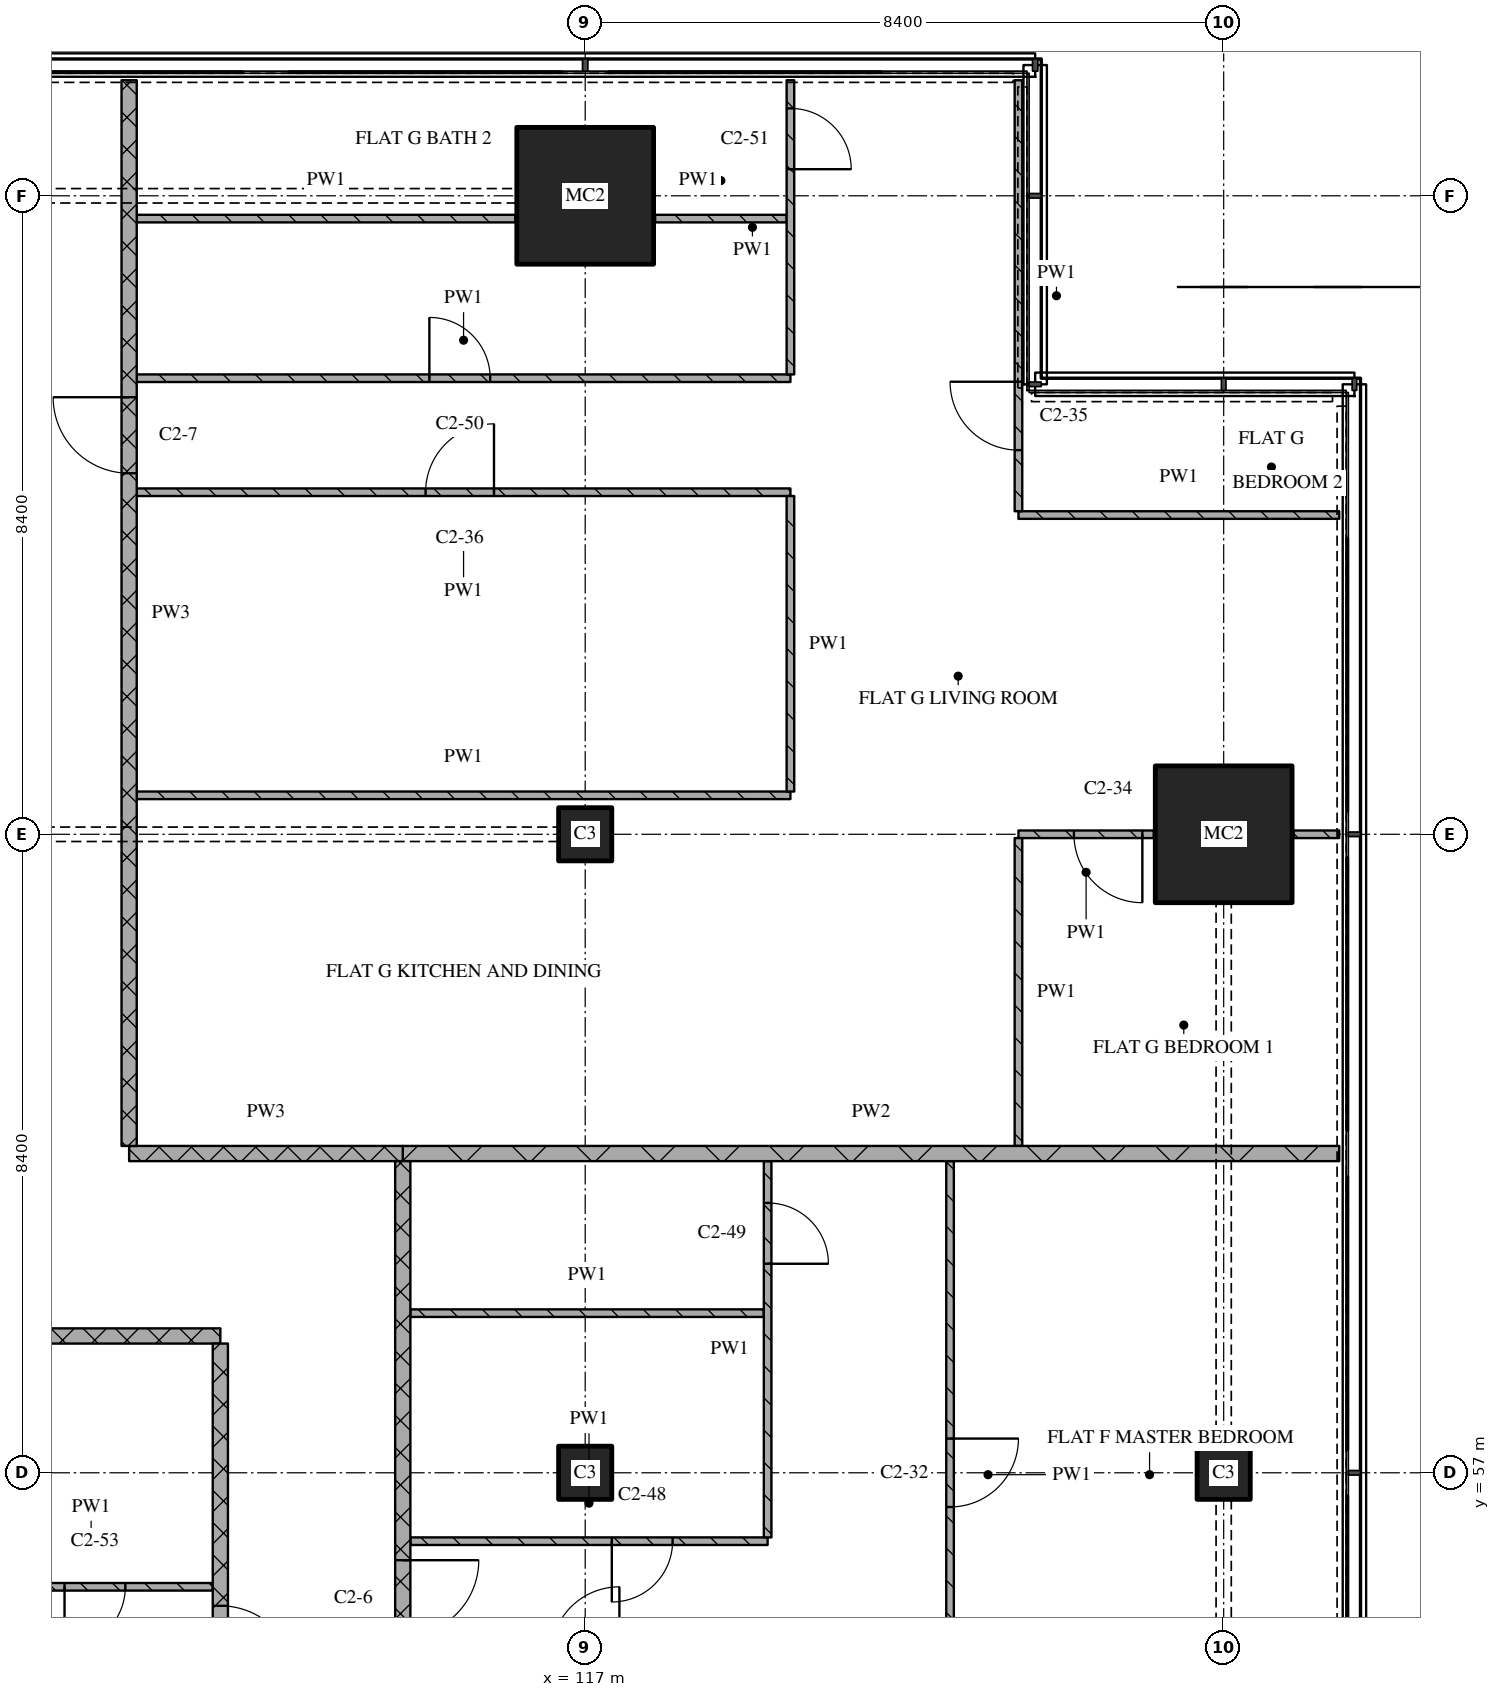
"""IFC4 building model, lengths in metres.
Left out: names, types, materials, properties, quantities, classifications, styles, units other than length and angle.
Written with IfcOpenShell. Run it as: python <this file> out.ifc"""

import sys

from ifc_helpers import new_model, si_unit, direction, frame, frame_2d, origin, origin_2d, place, context, subcontext, project, spatial, rectangle, extrude, element, fill, save


model = new_model("IFC4")
c1 = context("Model", 3, precision=1e-05, world=origin(), true_north=direction((0.0, 1.0)))
c2 = subcontext(c1, "Body", "Model", "MODEL_VIEW")
j1 = project(units=[si_unit("LENGTHUNIT", "METRE"), si_unit("PLANEANGLEUNIT", "RADIAN")], contexts=[c1])
p1 = place(None, origin())
s1 = spatial("IfcSite", under=j1, at=p1, CompositionType="ELEMENT")
p2 = place(p1, origin())
s2 = spatial("IfcBuilding", under=s1, at=p2, CompositionType="ELEMENT")
p3 = place(p2, frame((0.0, 0.0, 165.45)))
s3 = spatial("IfcBuildingStorey", under=s2, at=p3, CompositionType="ELEMENT", Elevation=165.45)
for number, where, z_axis, x_axis in (
    (1, (117.0, 57.0, 0.0), (0.0, 0.0, 1.0), (1.0, 0.0, 0.0)),
    (2, (117.0, 65.4, 0.0), (0.0, 0.0, 1.0), (1.0, 0.0, 0.0)),
):
    element("IfcColumn", number, at=place(p3, frame(where, z_axis=z_axis, x_axis=x_axis)), inside=s3, PredefinedType="COLUMN", context=c2, shape_type="SweptSolid", body=[
        extrude(rectangle(XDim=0.7, YDim=0.7, at=origin_2d()), origin(), (0.0, 0.0, 1.0), 3.6),
    ])
p4 = place(p3, frame((117.0, 73.8, 0.0), z_axis=(0.0, 0.0, 1.0), x_axis=(1.0, 0.0, 0.0)))
e3 = element("IfcColumn", 3, at=p4, inside=s3, PredefinedType="COLUMN", context=c2, shape_type="SweptSolid", body=[
    extrude(rectangle(XDim=1.8, YDim=1.8, at=origin_2d()), origin(), (0.0, 0.0, 1.0), 3.6),
])
p5 = place(p3, frame((125.4, 57.0, 0.0), z_axis=(0.0, 0.0, 1.0), x_axis=(1.0, 0.0, 0.0)))
e4 = element("IfcColumn", 4, at=p5, inside=s3, PredefinedType="COLUMN", context=c2, shape_type="SweptSolid", body=[
    extrude(rectangle(XDim=0.7, YDim=0.7, at=origin_2d()), origin(), (0.0, 0.0, 1.0), 3.6),
])
p6 = place(p3, frame((125.4, 65.4, 0.0), z_axis=(0.0, 0.0, 1.0), x_axis=(1.0, 0.0, 0.0)))
e5 = element("IfcColumn", 5, at=p6, inside=s3, PredefinedType="COLUMN", context=c2, shape_type="SweptSolid", body=[
    extrude(rectangle(XDim=1.8, YDim=1.8, at=origin_2d()), origin(), (0.0, 0.0, 1.0), 3.6),
])
p7 = place(p3, frame((108.9, 55.5, 0.0), z_axis=(0.0, 0.0, 1.0), x_axis=(1.0, 0.0, 0.0)))
e6 = element("IfcWall", 6, at=p7, inside=s3, PredefinedType="PARTITIONING", context=c2, shape_type="SweptSolid", body=[
    extrude(rectangle(XDim=3.2, YDim=0.1, at=frame_2d((1.6, 0.0))), origin(), (0.0, 0.0, 1.0), 3.32),
])
p8 = place(p7, frame((1.25, 0.0, 0.0)))
e7 = element("IfcOpeningElement", 7, at=p8, cuts=e6, PredefinedType="OPENING", context=c2, shape_type="SweptSolid", body=[
    extrude(rectangle(XDim=0.8, YDim=2.1, at=frame_2d((0.4, 1.05))), frame((0.0, 0.06, 0.0), z_axis=(0.0, -1.0, 0.0), x_axis=(1.0, 0.0, 0.0)), (0.0, 0.0, 1.0), 0.12),
])
p9 = place(p3, frame((114.7, 56.1, 0.0), z_axis=(0.0, 0.0, 1.0), x_axis=(1.0, 0.0, 0.0)))
e8 = element("IfcWall", 8, at=p9, inside=s3, PredefinedType="PARTITIONING", context=c2, shape_type="SweptSolid", body=[
    extrude(rectangle(XDim=4.7, YDim=0.1, at=frame_2d((2.35, 0.0))), origin(), (0.0, 0.0, 1.0), 3.32),
])
p10 = place(p9, frame((2.65, 0.0, 0.0)))
e9 = element("IfcOpeningElement", 9, at=p10, cuts=e8, PredefinedType="OPENING", context=c2, shape_type="SweptSolid", body=[
    extrude(rectangle(XDim=0.8, YDim=2.1, at=frame_2d((0.4, 1.05))), frame((0.0, 0.06, 0.0), z_axis=(0.0, -1.0, 0.0), x_axis=(1.0, 0.0, 0.0)), (0.0, 0.0, 1.0), 0.12),
])
p11 = place(p3, frame((101.4, 58.8, 0.0), z_axis=(0.0, 0.0, 1.0), x_axis=(1.0, 0.0, 0.0)))
e10 = element("IfcWall", 10, at=p11, inside=s3, PredefinedType="PARTITIONING", context=c2, shape_type="SweptSolid", body=[
    extrude(rectangle(XDim=10.8, YDim=0.2, at=frame_2d((5.4, 0.0))), origin(), (0.0, 0.0, 1.0), 3.32),
])
p12 = place(p3, frame((114.7, 59.1, 0.0), z_axis=(0.0, 0.0, 1.0), x_axis=(1.0, 0.0, 0.0)))
e11 = element("IfcWall", 11, at=p12, inside=s3, PredefinedType="PARTITIONING", context=c2, shape_type="SweptSolid", body=[
    extrude(rectangle(XDim=4.65, YDim=0.1, at=frame_2d((2.325, 0.0))), origin(), (0.0, 0.0, 1.0), 3.32),
])
p13 = place(p3, frame((111.0, 61.2, 0.0), z_axis=(0.0, 0.0, 1.0), x_axis=(1.0, 0.0, 0.0)))
e12 = element("IfcWall", 12, at=p13, inside=s3, PredefinedType="PARTITIONING", context=c2, shape_type="SweptSolid", body=[
    extrude(rectangle(XDim=3.6, YDim=0.2, at=frame_2d((1.8, 0.0))), origin(), (0.0, 0.0, 1.0), 3.32),
])
p14 = place(p3, frame((114.6, 61.2, 0.0), z_axis=(0.0, 0.0, 1.0), x_axis=(1.0, 0.0, 0.0)))
e13 = element("IfcWall", 13, at=p14, inside=s3, PredefinedType="PARTITIONING", context=c2, shape_type="SweptSolid", body=[
    extrude(rectangle(XDim=12.32, YDim=0.2, at=frame_2d((6.16, 0.0))), origin(), (0.0, 0.0, 1.0), 3.32),
])
p15 = place(p3, frame((124.48, 65.4, 0.0), z_axis=(0.0, 0.0, 1.0), x_axis=(-1.0, 0.0, 0.0)))
e14 = element("IfcWall", 14, at=p15, inside=s3, PredefinedType="PARTITIONING", context=c2, shape_type="SweptSolid", body=[
    extrude(rectangle(XDim=1.78, YDim=0.1, at=frame_2d((0.89, 0.0))), origin(), (0.0, 0.0, 1.0), 3.32),
])
p16 = place(p15, frame((0.15, 0.0, 0.0)))
e15 = element("IfcOpeningElement", 15, at=p16, cuts=e14, PredefinedType="OPENING", context=c2, shape_type="SweptSolid", body=[
    extrude(rectangle(XDim=0.9, YDim=2.1, at=frame_2d((0.45, 1.05))), frame((0.0, 0.06, 0.0), z_axis=(0.0, -1.0, 0.0), x_axis=(1.0, 0.0, 0.0)), (0.0, 0.0, 1.0), 0.12),
])
p17 = place(p3, frame((126.32, 65.4, 0.0), z_axis=(0.0, 0.0, 1.0), x_axis=(1.0, 0.0, 0.0)))
e16 = element("IfcWall", 16, at=p17, inside=s3, PredefinedType="PARTITIONING", context=c2, shape_type="SweptSolid", body=[
    extrude(rectangle(XDim=0.6, YDim=0.1, at=frame_2d((0.3, 0.0))), origin(), (0.0, 0.0, 1.0), 3.32),
])
p18 = place(p3, frame((111.1, 65.913, 0.0), z_axis=(0.0, 0.0, 1.0), x_axis=(1.0, 0.0, 0.0)))
e17 = element("IfcWall", 17, at=p18, inside=s3, PredefinedType="PARTITIONING", context=c2, shape_type="SweptSolid", body=[
    extrude(rectangle(XDim=8.6, YDim=0.1, at=frame_2d((4.3, 0.0))), origin(), (0.0, 0.0, 1.0), 3.32),
])
p19 = place(p3, frame((122.7, 69.6, 0.0), z_axis=(0.0, 0.0, 1.0), x_axis=(1.0, 0.0, 0.0)))
e18 = element("IfcWall", 18, at=p19, inside=s3, PredefinedType="PARTITIONING", context=c2, shape_type="SweptSolid", body=[
    extrude(rectangle(XDim=4.22, YDim=0.1, at=frame_2d((2.11, 0.0))), origin(), (0.0, 0.0, 1.0), 3.32),
])
p20 = place(p3, frame((119.7, 69.9, 0.0), z_axis=(0.0, 0.0, 1.0), x_axis=(-1.0, 0.0, 0.0)))
e19 = element("IfcWall", 19, at=p20, inside=s3, PredefinedType="PARTITIONING", context=c2, shape_type="SweptSolid", body=[
    extrude(rectangle(XDim=8.6, YDim=0.1, at=frame_2d((4.3, 0.0))), origin(), (0.0, 0.0, 1.0), 3.32),
])
p21 = place(p20, frame((3.9, 0.0, 0.0)))
e20 = element("IfcOpeningElement", 20, at=p21, cuts=e19, PredefinedType="OPENING", context=c2, shape_type="SweptSolid", body=[
    extrude(rectangle(XDim=0.9, YDim=2.1, at=frame_2d((0.45, 1.05))), frame((0.0, 0.06, 0.0), z_axis=(0.0, -1.0, 0.0), x_axis=(1.0, 0.0, 0.0)), (0.0, 0.0, 1.0), 0.12),
])
p22 = place(p3, frame((111.1, 71.4, 0.0), z_axis=(0.0, 0.0, 1.0), x_axis=(1.0, 0.0, 0.0)))
e21 = element("IfcWall", 21, at=p22, inside=s3, PredefinedType="PARTITIONING", context=c2, shape_type="SweptSolid", body=[
    extrude(rectangle(XDim=8.6, YDim=0.1, at=frame_2d((4.3, 0.0))), origin(), (0.0, 0.0, 1.0), 3.32),
])
p23 = place(p22, frame((3.85, 0.0, 0.0)))
e22 = element("IfcOpeningElement", 22, at=p23, cuts=e21, PredefinedType="OPENING", context=c2, shape_type="SweptSolid", body=[
    extrude(rectangle(XDim=0.8, YDim=2.1, at=frame_2d((0.4, 1.05))), frame((0.0, 0.06, 0.0), z_axis=(0.0, -1.0, 0.0), x_axis=(1.0, 0.0, 0.0)), (0.0, 0.0, 1.0), 0.12),
])
p24 = place(p3, frame((111.1, 73.5, 0.0), z_axis=(0.0, 0.0, 1.0), x_axis=(1.0, 0.0, 0.0)))
e23 = element("IfcWall", 23, at=p24, inside=s3, PredefinedType="PARTITIONING", context=c2, shape_type="SweptSolid", body=[
    extrude(rectangle(XDim=4.98, YDim=0.1, at=frame_2d((2.49, 0.0))), origin(), (0.0, 0.0, 1.0), 3.32),
])
p25 = place(p3, frame((117.92, 73.5, 0.0), z_axis=(0.0, 0.0, 1.0), x_axis=(1.0, 0.0, 0.0)))
e24 = element("IfcWall", 24, at=p25, inside=s3, PredefinedType="PARTITIONING", context=c2, shape_type="SweptSolid", body=[
    extrude(rectangle(XDim=1.73, YDim=0.1, at=frame_2d((0.865, 0.0))), origin(), (0.0, 0.0, 1.0), 3.32),
])
p26 = place(p3, frame((111.0, 75.32, 0.0), z_axis=(0.0, 0.0, 1.0), x_axis=(0.0, -1.0, 0.0)))
e25 = element("IfcWall", 25, at=p26, inside=s3, PredefinedType="PARTITIONING", context=c2, shape_type="SweptSolid", body=[
    extrude(rectangle(XDim=14.02, YDim=0.2, at=frame_2d((7.01, 0.0))), origin(), (0.0, 0.0, 1.0), 3.32),
])
p27 = place(p26, frame((4.17, 0.0, 0.0)))
e26 = element("IfcOpeningElement", 26, at=p27, cuts=e25, PredefinedType="OPENING", context=c2, shape_type="SweptSolid", body=[
    extrude(rectangle(XDim=1.0, YDim=2.1, at=frame_2d((0.5, 1.05))), frame((0.0, 0.11, 0.0), z_axis=(0.0, -1.0, 0.0), x_axis=(1.0, 0.0, 0.0)), (0.0, 0.0, 1.0), 0.22),
])
p28 = place(p3, frame((112.2, 43.3, 0.0), z_axis=(0.0, 0.0, 1.0), x_axis=(0.0, 1.0, 0.0)))
e27 = element("IfcWall", 27, at=p28, inside=s3, PredefinedType="PARTITIONING", context=c2, shape_type="SweptSolid", body=[
    extrude(rectangle(XDim=15.4, YDim=0.2, at=frame_2d((7.7, 0.0))), origin(), (0.0, 0.0, 1.0), 3.32),
])
p29 = place(p28, frame((10.95, 0.0, 0.0)))
e28 = element("IfcOpeningElement", 28, at=p29, cuts=e27, PredefinedType="OPENING", context=c2, shape_type="SweptSolid", body=[
    extrude(rectangle(XDim=1.0, YDim=2.1, at=frame_2d((0.5, 1.05))), frame((0.0, 0.11, 0.0), z_axis=(0.0, -1.0, 0.0), x_axis=(1.0, 0.0, 0.0)), (0.0, 0.0, 1.0), 0.22),
])
p30 = place(p3, frame((114.6, 61.1, 0.0), z_axis=(0.0, 0.0, 1.0), x_axis=(0.0, -1.0, 0.0)))
e29 = element("IfcWall", 29, at=p30, inside=s3, PredefinedType="PARTITIONING", context=c2, shape_type="SweptSolid", body=[
    extrude(rectangle(XDim=17.8, YDim=0.2, at=frame_2d((8.9, 0.0))), origin(), (0.0, 0.0, 1.0), 3.32),
])
p31 = place(p30, frame((5.25, 0.0, 0.0)))
e30 = element("IfcOpeningElement", 30, at=p31, cuts=e29, PredefinedType="OPENING", context=c2, shape_type="SweptSolid", body=[
    extrude(rectangle(XDim=1.0, YDim=2.1, at=frame_2d((0.5, 1.05))), frame((0.0, 0.11, 0.0), z_axis=(0.0, -1.0, 0.0), x_axis=(1.0, 0.0, 0.0)), (0.0, 0.0, 1.0), 0.22),
])
p32 = place(p3, frame((119.4, 56.15, 0.0), z_axis=(0.0, 0.0, 1.0), x_axis=(0.0, 1.0, 0.0)))
e31 = element("IfcWall", 31, at=p32, inside=s3, PredefinedType="PARTITIONING", context=c2, shape_type="SweptSolid", body=[
    extrude(rectangle(XDim=4.95, YDim=0.1, at=frame_2d((2.475, 0.0))), origin(), (0.0, 0.0, 1.0), 3.32),
])
p33 = place(p32, frame((3.6, 0.0, 0.0)))
e32 = element("IfcOpeningElement", 32, at=p33, cuts=e31, PredefinedType="OPENING", context=c2, shape_type="SweptSolid", body=[
    extrude(rectangle(XDim=0.8, YDim=2.1, at=frame_2d((0.4, 1.05))), frame((0.0, 0.06, 0.0), z_axis=(0.0, -1.0, 0.0), x_axis=(1.0, 0.0, 0.0)), (0.0, 0.0, 1.0), 0.12),
])
p34 = place(p3, frame((119.7, 69.85, 0.0), z_axis=(0.0, 0.0, 1.0), x_axis=(0.0, -1.0, 0.0)))
e33 = element("IfcWall", 33, at=p34, inside=s3, PredefinedType="PARTITIONING", context=c2, shape_type="SweptSolid", body=[
    extrude(rectangle(XDim=3.887, YDim=0.1, at=frame_2d((1.944, 0.0))), origin(), (0.0, 0.0, 1.0), 3.32),
])
p35 = place(p3, frame((119.7, 71.45, 0.0), z_axis=(0.0, 0.0, 1.0), x_axis=(0.0, 1.0, 0.0)))
e34 = element("IfcWall", 34, at=p35, inside=s3, PredefinedType="PARTITIONING", context=c2, shape_type="SweptSolid", body=[
    extrude(rectangle(XDim=3.87, YDim=0.1, at=frame_2d((1.935, 0.0))), origin(), (0.0, 0.0, 1.0), 3.32),
])
p36 = place(p35, frame((2.7, 0.0, 0.0)))
e35 = element("IfcOpeningElement", 35, at=p36, cuts=e34, PredefinedType="OPENING", context=c2, shape_type="SweptSolid", body=[
    extrude(rectangle(XDim=0.8, YDim=2.1, at=frame_2d((0.4, 1.05))), frame((0.0, 0.06, 0.0), z_axis=(0.0, -1.0, 0.0), x_axis=(1.0, 0.0, 0.0)), (0.0, 0.0, 1.0), 0.12),
])
p37 = place(p3, frame((121.8, 61.1, 0.0), z_axis=(0.0, 0.0, 1.0), x_axis=(0.0, -1.0, 0.0)))
e36 = element("IfcWall", 36, at=p37, inside=s3, PredefinedType="PARTITIONING", context=c2, shape_type="SweptSolid", body=[
    extrude(rectangle(XDim=8.25, YDim=0.1, at=frame_2d((4.125, 0.0))), origin(), (0.0, 0.0, 1.0), 3.32),
])
p38 = place(p37, frame((3.65, 0.0, 0.0)))
e37 = element("IfcOpeningElement", 37, at=p38, cuts=e36, PredefinedType="OPENING", context=c2, shape_type="SweptSolid", body=[
    extrude(rectangle(XDim=0.9, YDim=2.1, at=frame_2d((0.45, 1.05))), frame((0.0, 0.06, 0.0), z_axis=(0.0, -1.0, 0.0), x_axis=(1.0, 0.0, 0.0)), (0.0, 0.0, 1.0), 0.12),
])
p39 = place(p3, frame((122.7, 65.35, 0.0), z_axis=(0.0, 0.0, 1.0), x_axis=(0.0, -1.0, 0.0)))
e38 = element("IfcWall", 38, at=p39, inside=s3, PredefinedType="PARTITIONING", context=c2, shape_type="SweptSolid", body=[
    extrude(rectangle(XDim=4.05, YDim=0.1, at=frame_2d((2.025, 0.0))), origin(), (0.0, 0.0, 1.0), 3.32),
])
p40 = place(p3, frame((122.7, 75.32, 0.0), z_axis=(0.0, 0.0, 1.0), x_axis=(0.0, -1.0, 0.0)))
e39 = element("IfcWall", 39, at=p40, inside=s3, PredefinedType="PARTITIONING", context=c2, shape_type="SweptSolid", body=[
    extrude(rectangle(XDim=5.67, YDim=0.1, at=frame_2d((2.835, 0.0))), origin(), (0.0, 0.0, 1.0), 3.32),
])
p41 = place(p40, frame((3.966, 0.0, 0.0)))
e40 = element("IfcOpeningElement", 40, at=p41, cuts=e39, PredefinedType="OPENING", context=c2, shape_type="SweptSolid", body=[
    extrude(rectangle(XDim=0.9, YDim=2.1, at=frame_2d((0.45, 1.05))), frame((0.0, 0.06, 0.0), z_axis=(0.0, -1.0, 0.0), x_axis=(1.0, 0.0, 0.0)), (0.0, 0.0, 1.0), 0.12),
])
p42 = place(p8, origin())
e41 = element("IfcDoor", 41, at=p42, inside=s3, OperationType="SINGLE_SWING_RIGHT", PredefinedType="DOOR", context=c2, shape_type="SweptSolid", body=[
    extrude(rectangle(XDim=0.8, YDim=2.1, at=frame_2d((0.4, 1.05))), frame((0.0, 0.025, 0.0), z_axis=(0.0, -1.0, 0.0), x_axis=(1.0, 0.0, 0.0)), (0.0, 0.0, 1.0), 0.05),
])
fill(e7, e41)
p43 = place(p10, origin())
e42 = element("IfcDoor", 42, at=p43, inside=s3, OperationType="SINGLE_SWING_RIGHT", PredefinedType="DOOR", context=c2, shape_type="SweptSolid", body=[
    extrude(rectangle(XDim=0.8, YDim=2.1, at=frame_2d((0.4, 1.05))), frame((0.0, 0.025, 0.0), z_axis=(0.0, -1.0, 0.0), x_axis=(1.0, 0.0, 0.0)), (0.0, 0.0, 1.0), 0.05),
])
fill(e9, e42)
p44 = place(p16, origin())
e43 = element("IfcDoor", 43, at=p44, inside=s3, OperationType="SINGLE_SWING_LEFT", PredefinedType="DOOR", context=c2, shape_type="SweptSolid", body=[
    extrude(rectangle(XDim=0.9, YDim=2.1, at=frame_2d((0.45, 1.05))), frame((0.0, 0.025, 0.0), z_axis=(0.0, -1.0, 0.0), x_axis=(1.0, 0.0, 0.0)), (0.0, 0.0, 1.0), 0.05),
])
fill(e15, e43)
p45 = place(p21, origin())
e44 = element("IfcDoor", 44, at=p45, inside=s3, OperationType="SINGLE_SWING_RIGHT", PredefinedType="DOOR", context=c2, shape_type="SweptSolid", body=[
    extrude(rectangle(XDim=0.9, YDim=2.1, at=frame_2d((0.45, 1.05))), frame((0.0, 0.025, 0.0), z_axis=(0.0, -1.0, 0.0), x_axis=(1.0, 0.0, 0.0)), (0.0, 0.0, 1.0), 0.05),
])
fill(e20, e44)
p46 = place(p23, origin())
e45 = element("IfcDoor", 45, at=p46, inside=s3, OperationType="SINGLE_SWING_LEFT", PredefinedType="DOOR", context=c2, shape_type="SweptSolid", body=[
    extrude(rectangle(XDim=0.8, YDim=2.1, at=frame_2d((0.4, 1.05))), frame((0.0, 0.025, 0.0), z_axis=(0.0, -1.0, 0.0), x_axis=(1.0, 0.0, 0.0)), (0.0, 0.0, 1.0), 0.05),
])
fill(e22, e45)
p47 = place(p27, origin())
e46 = element("IfcDoor", 46, at=p47, inside=s3, OperationType="SINGLE_SWING_RIGHT", PredefinedType="DOOR", context=c2, shape_type="SweptSolid", body=[
    extrude(rectangle(XDim=1.0, YDim=2.1, at=frame_2d((0.5, 1.05))), frame((0.0, 0.025, 0.0), z_axis=(0.0, -1.0, 0.0), x_axis=(1.0, 0.0, 0.0)), (0.0, 0.0, 1.0), 0.05),
])
fill(e26, e46)
p48 = place(p29, origin())
e47 = element("IfcDoor", 47, at=p48, inside=s3, OperationType="SINGLE_SWING_RIGHT", PredefinedType="DOOR", context=c2, shape_type="SweptSolid", body=[
    extrude(rectangle(XDim=1.0, YDim=2.1, at=frame_2d((0.5, 1.05))), frame((0.0, 0.025, 0.0), z_axis=(0.0, -1.0, 0.0), x_axis=(1.0, 0.0, 0.0)), (0.0, 0.0, 1.0), 0.05),
])
fill(e28, e47)
p49 = place(p31, origin())
e48 = element("IfcDoor", 48, at=p49, inside=s3, OperationType="SINGLE_SWING_LEFT", PredefinedType="DOOR", context=c2, shape_type="SweptSolid", body=[
    extrude(rectangle(XDim=1.0, YDim=2.1, at=frame_2d((0.5, 1.05))), frame((0.0, 0.025, 0.0), z_axis=(0.0, -1.0, 0.0), x_axis=(1.0, 0.0, 0.0)), (0.0, 0.0, 1.0), 0.05),
])
fill(e30, e48)
p50 = place(p33, origin())
e49 = element("IfcDoor", 49, at=p50, inside=s3, OperationType="SINGLE_SWING_RIGHT", PredefinedType="DOOR", context=c2, shape_type="SweptSolid", body=[
    extrude(rectangle(XDim=0.8, YDim=2.1, at=frame_2d((0.4, 1.05))), frame((0.0, 0.025, 0.0), z_axis=(0.0, -1.0, 0.0), x_axis=(1.0, 0.0, 0.0)), (0.0, 0.0, 1.0), 0.05),
])
fill(e32, e49)
p51 = place(p36, origin())
e50 = element("IfcDoor", 50, at=p51, inside=s3, OperationType="SINGLE_SWING_RIGHT", PredefinedType="DOOR", context=c2, shape_type="SweptSolid", body=[
    extrude(rectangle(XDim=0.8, YDim=2.1, at=frame_2d((0.4, 1.05))), frame((0.0, 0.025, 0.0), z_axis=(0.0, -1.0, 0.0), x_axis=(1.0, 0.0, 0.0)), (0.0, 0.0, 1.0), 0.05),
])
fill(e35, e50)
p52 = place(p38, origin())
e51 = element("IfcDoor", 51, at=p52, inside=s3, OperationType="SINGLE_SWING_LEFT", PredefinedType="DOOR", context=c2, shape_type="SweptSolid", body=[
    extrude(rectangle(XDim=0.9, YDim=2.1, at=frame_2d((0.45, 1.05))), frame((0.0, 0.025, 0.0), z_axis=(0.0, -1.0, 0.0), x_axis=(1.0, 0.0, 0.0)), (0.0, 0.0, 1.0), 0.05),
])
fill(e37, e51)
p53 = place(p41, origin())
e52 = element("IfcDoor", 52, at=p53, inside=s3, OperationType="SINGLE_SWING_RIGHT", PredefinedType="DOOR", context=c2, shape_type="SweptSolid", body=[
    extrude(rectangle(XDim=0.9, YDim=2.1, at=frame_2d((0.45, 1.05))), frame((0.0, 0.025, 0.0), z_axis=(0.0, -1.0, 0.0), x_axis=(1.0, 0.0, 0.0)), (0.0, 0.0, 1.0), 0.05),
])
fill(e40, e52)
save(model, sys.argv[1])
